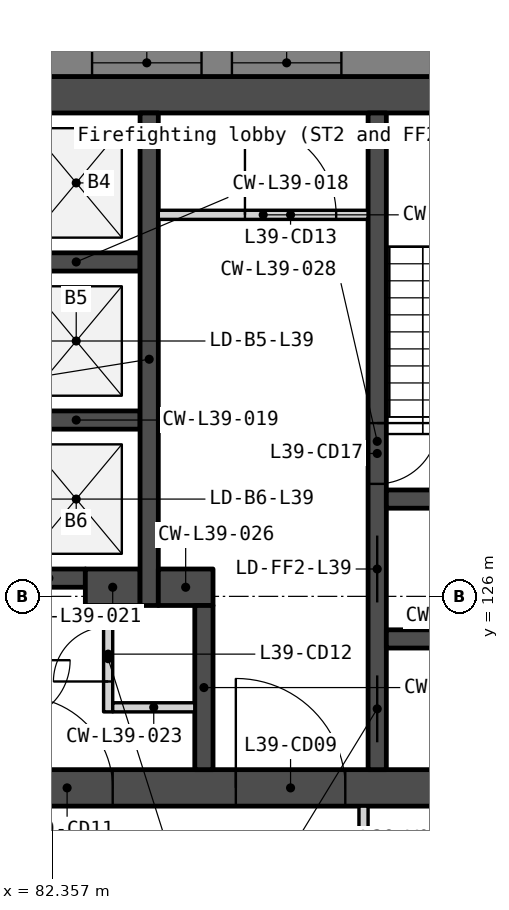
"""IFC4 building model, lengths in metres.
Left out: names, types, materials, properties, quantities, classifications, styles, units other than length and angle.
Written with IfcOpenShell. Run it as: python <this file> out.ifc"""

import sys

from ifc_helpers import new_model, si_unit, direction, frame, frame_2d, origin, place, context, subcontext, project, spatial, polyline, rectangle, outline, extrude, element, fill, save


model = new_model("IFC4")
c1 = context("Model", 3, precision=1e-05, world=origin(), true_north=direction((0.0, 1.0)))
c2 = subcontext(c1, "Body", "Model", "MODEL_VIEW")
j1 = project(units=[si_unit("LENGTHUNIT", "METRE"), si_unit("PLANEANGLEUNIT", "RADIAN")], contexts=[c1])
p1 = place(None, origin())
s1 = spatial("IfcSite", under=j1, at=p1, CompositionType="ELEMENT")
p2 = place(p1, origin())
s2 = spatial("IfcBuilding", under=s1, at=p2, CompositionType="ELEMENT")
p3 = place(p2, frame((0.0, 0.0, 155.9)))
s3 = spatial("IfcBuildingStorey", under=s2, at=p3, CompositionType="ELEMENT", Elevation=155.9)
p4 = place(p3, frame((69.0, 134.25, 0.0), z_axis=(0.0, 0.0, 1.0), x_axis=(1.0, 0.0, 0.0)))
e1 = element("IfcWall", 1, at=p4, inside=s3, PredefinedType="SOLIDWALL", context=c2, shape_type="SweptSolid", body=[
    extrude(rectangle(XDim=22.0, YDim=0.6, at=frame_2d((11.0, 0.0))), origin(), (0.0, 0.0, 1.0), 3.75),
])
p5 = place(p3, frame((69.0, 122.85, 0.0), z_axis=(0.0, 0.0, 1.0), x_axis=(1.0, 0.0, 0.0)))
e2 = element("IfcWall", 2, at=p5, inside=s3, PredefinedType="SOLIDWALL", context=c2, shape_type="SweptSolid", body=[
    extrude(rectangle(XDim=22.0, YDim=0.6, at=frame_2d((11.0, 0.0))), origin(), (0.0, 0.0, 1.0), 3.75),
])
p6 = place(p5, frame((16.375, 0.0, 0.0)))
e3 = element("IfcOpeningElement", 3, at=p6, cuts=e2, PredefinedType="OPENING", context=c2, shape_type="SweptSolid", body=[
    extrude(rectangle(XDim=1.8, YDim=2.1, at=frame_2d((0.9, 1.05))), frame((0.0, 0.31, 0.0), z_axis=(0.0, -1.0, 0.0), x_axis=(1.0, 0.0, 0.0)), (0.0, 0.0, 1.0), 0.62),
])
p7 = place(p5, frame((3.825, 0.0, 0.0)))
e4 = element("IfcOpeningElement", 4, at=p7, cuts=e2, PredefinedType="OPENING", context=c2, shape_type="SweptSolid", body=[
    extrude(rectangle(XDim=1.8, YDim=2.1, at=frame_2d((0.9, 1.05))), frame((0.0, 0.31, 0.0), z_axis=(0.0, -1.0, 0.0), x_axis=(1.0, 0.0, 0.0)), (0.0, 0.0, 1.0), 0.62),
])
p8 = place(p5, frame((12.85, 0.0, 0.0)))
e5 = element("IfcOpeningElement", 5, at=p8, cuts=e2, PredefinedType="OPENING", context=c2, shape_type="SweptSolid", body=[
    extrude(rectangle(XDim=1.5, YDim=2.1, at=frame_2d((0.75, 1.05))), frame((0.0, 0.31, 0.0), z_axis=(0.0, -1.0, 0.0), x_axis=(1.0, 0.0, 0.0)), (0.0, 0.0, 1.0), 0.62),
])
for number, where, z_axis, x_axis in (
    (6, (81.7, 131.5, 0.0), (0.0, 0.0, 1.0), (1.0, 0.0, 0.0)),
    (7, (81.7, 128.9, 0.0), (0.0, 0.0, 1.0), (1.0, 0.0, 0.0)),
):
    element("IfcWall", number, at=place(p3, frame(where, z_axis=z_axis, x_axis=x_axis)), inside=s3, PredefinedType="SOLIDWALL", context=c2, shape_type="SweptSolid", body=[
        extrude(rectangle(XDim=2.1, YDim=0.3, at=frame_2d((1.05, 0.0))), origin(), (0.0, 0.0, 1.0), 3.75),
    ])
p9 = place(p3, frame((81.7, 126.3, 0.0), z_axis=(0.0, 0.0, 1.0), x_axis=(1.0, 0.0, 0.0)))
e8 = element("IfcWall", 8, at=p9, inside=s3, PredefinedType="SOLIDWALL", context=c2, shape_type="SweptSolid", body=[
    extrude(rectangle(XDim=1.2, YDim=0.3, at=frame_2d((0.6, 0.0))), origin(), (0.0, 0.0, 1.0), 3.75),
])
p10 = place(p3, frame((82.9, 126.15, 0.0), z_axis=(0.0, 0.0, 1.0), x_axis=(1.0, 0.0, 0.0)))
e9 = element("IfcWall", 9, at=p10, inside=s3, PredefinedType="SOLIDWALL", context=c2, shape_type="SweptSolid", body=[
    extrude(rectangle(XDim=0.9, YDim=0.6, at=frame_2d((0.45, 0.0))), origin(), (0.0, 0.0, 1.0), 3.75),
])
p11 = place(p3, frame((83.275, 125.85, 0.0), z_axis=(0.0, 0.0, 1.0), x_axis=(0.0, -1.0, 0.0)))
e10 = element("IfcWall", 10, at=p11, inside=s3, PredefinedType="PARTITIONING", context=c2, shape_type="SweptSolid", body=[
    extrude(rectangle(XDim=1.75, YDim=0.15, at=frame_2d((0.875, 0.0))), origin(), (0.0, 0.0, 1.0), 3.75),
])
p12 = place(p11, frame((0.35, 0.0, 0.0)))
e11 = element("IfcOpeningElement", 11, at=p12, cuts=e10, PredefinedType="OPENING", context=c2, shape_type="SweptSolid", body=[
    extrude(rectangle(XDim=0.9, YDim=2.1, at=frame_2d((0.45, 1.05))), frame((0.0, 0.085, 0.0), z_axis=(0.0, -1.0, 0.0), x_axis=(1.0, 0.0, 0.0)), (0.0, 0.0, 1.0), 0.17),
])
p13 = place(p3, frame((83.35, 124.175, 0.0), z_axis=(0.0, 0.0, 1.0), x_axis=(1.0, 0.0, 0.0)))
e12 = element("IfcWall", 12, at=p13, inside=s3, PredefinedType="PARTITIONING", context=c2, shape_type="SweptSolid", body=[
    extrude(rectangle(XDim=1.35, YDim=0.15, at=frame_2d((0.675, 0.0))), origin(), (0.0, 0.0, 1.0), 3.75),
])
p14 = place(p3, frame((83.95, 133.95, 0.0), z_axis=(0.0, 0.0, 1.0), x_axis=(0.0, -1.0, 0.0)))
e13 = element("IfcWall", 13, at=p14, inside=s3, PredefinedType="SOLIDWALL", context=c2, shape_type="SweptSolid", body=[
    extrude(rectangle(XDim=8.1, YDim=0.3, at=frame_2d((4.05, 0.0))), origin(), (0.0, 0.0, 1.0), 3.75),
])
p15 = place(p3, frame((84.1, 132.275, 0.0), z_axis=(0.0, 0.0, 1.0), x_axis=(1.0, 0.0, 0.0)))
e14 = element("IfcWall", 14, at=p15, inside=s3, PredefinedType="PARTITIONING", context=c2, shape_type="SweptSolid", body=[
    extrude(rectangle(XDim=3.45, YDim=0.15, at=frame_2d((1.725, 0.0))), origin(), (0.0, 0.0, 1.0), 3.75),
])
p16 = place(p15, frame((1.425, 0.0, 0.0)))
e15 = element("IfcOpeningElement", 15, at=p16, cuts=e14, PredefinedType="OPENING", context=c2, shape_type="SweptSolid", body=[
    extrude(rectangle(XDim=1.5, YDim=2.1, at=frame_2d((0.75, 1.05))), frame((0.0, 0.085, 0.0), z_axis=(0.0, -1.0, 0.0), x_axis=(1.0, 0.0, 0.0)), (0.0, 0.0, 1.0), 0.17),
])
p17 = place(p3, frame((84.1, 126.15, 0.0), z_axis=(0.0, 0.0, 1.0), x_axis=(1.0, 0.0, 0.0)))
e16 = element("IfcWall", 16, at=p17, inside=s3, PredefinedType="SOLIDWALL", context=c2, shape_type="SweptSolid", body=[
    extrude(rectangle(XDim=0.9, YDim=0.6, at=frame_2d((0.45, 0.0))), origin(), (0.0, 0.0, 1.0), 3.75),
])
p18 = place(p3, frame((84.85, 125.85, 0.0), z_axis=(0.0, 0.0, 1.0), x_axis=(0.0, -1.0, 0.0)))
e17 = element("IfcWall", 17, at=p18, inside=s3, PredefinedType="SOLIDWALL", context=c2, shape_type="SweptSolid", body=[
    extrude(rectangle(XDim=2.7, YDim=0.3, at=frame_2d((1.35, 0.0))), origin(), (0.0, 0.0, 1.0), 3.75),
])
p19 = place(p3, frame((87.7, 133.95, 0.0), z_axis=(0.0, 0.0, 1.0), x_axis=(0.0, -1.0, 0.0)))
e18 = element("IfcWall", 18, at=p19, inside=s3, PredefinedType="SOLIDWALL", context=c2, shape_type="SweptSolid", body=[
    extrude(rectangle(XDim=10.8, YDim=0.3, at=frame_2d((5.4, 0.0))), origin(), (0.0, 0.0, 1.0), 3.75),
])
p20 = place(p19, frame((6.95, 0.0, 0.0)))
e19 = element("IfcOpeningElement", 19, at=p20, cuts=e18, PredefinedType="OPENING", context=c2, shape_type="SweptSolid", body=[
    extrude(rectangle(XDim=1.1, YDim=2.1, at=frame_2d((0.55, 1.05))), frame((0.0, 0.16, 0.0), z_axis=(0.0, -1.0, 0.0), x_axis=(1.0, 0.0, 0.0)), (0.0, 0.0, 1.0), 0.32),
])
p21 = place(p19, frame((5.1, 0.0, 0.0)))
e20 = element("IfcOpeningElement", 20, at=p21, cuts=e18, PredefinedType="OPENING", context=c2, shape_type="SweptSolid", body=[
    extrude(rectangle(XDim=1.0, YDim=2.1, at=frame_2d((0.5, 1.05))), frame((0.0, 0.16, 0.0), z_axis=(0.0, -1.0, 0.0), x_axis=(1.0, 0.0, 0.0)), (0.0, 0.0, 1.0), 0.32),
])
p22 = place(p19, frame((9.25, 0.0, 0.0)))
e21 = element("IfcOpeningElement", 21, at=p22, cuts=e18, PredefinedType="OPENING", context=c2, shape_type="SweptSolid", body=[
    extrude(rectangle(XDim=1.1, YDim=2.1, at=frame_2d((0.55, 1.05))), frame((0.0, 0.16, 0.0), z_axis=(0.0, -1.0, 0.0), x_axis=(1.0, 0.0, 0.0)), (0.0, 0.0, 1.0), 0.32),
])
for number, where, z_axis, x_axis in (
    (22, (87.85, 127.6, 0.0), (0.0, 0.0, 1.0), (1.0, 0.0, 0.0)),
    (23, (87.85, 125.3, 0.0), (0.0, 0.0, 1.0), (1.0, 0.0, 0.0)),
):
    element("IfcWall", number, at=place(p3, frame(where, z_axis=z_axis, x_axis=x_axis)), inside=s3, PredefinedType="SOLIDWALL", context=c2, shape_type="SweptSolid", body=[
        extrude(rectangle(XDim=2.55, YDim=0.3, at=frame_2d((1.275, 0.0))), origin(), (0.0, 0.0, 1.0), 3.75),
    ])
p23 = place(p3, frame((100.243, 134.775, -0.15), z_axis=(0.0, 0.0, 1.0), x_axis=(-1.0, 0.0, 0.0)))
e24 = element("IfcWall", 24, at=p23, inside=s3, PredefinedType="SOLIDWALL", context=c2, shape_type="SweptSolid", body=[
    extrude(outline(polyline([(40.486, 0.0), (40.486, 3.9), (0.0, 3.9), (0.0, 0.0), (40.486, 0.0)])), frame((0.0, 0.225, 0.0), z_axis=(0.0, -1.0, 0.0), x_axis=(1.0, 0.0, 0.0)), (0.0, 0.0, 1.0), 0.45),
])
p24 = place(p23, frame((3.011, 0.0, 0.95)))
e25 = element("IfcOpeningElement", 25, at=p24, cuts=e24, PredefinedType="OPENING", context=c2, shape_type="SweptSolid", body=[
    extrude(rectangle(XDim=1.8, YDim=2.2, at=frame_2d((0.9, 1.1))), frame((0.0, 0.235, 0.0), z_axis=(0.0, -1.0, 0.0), x_axis=(1.0, 0.0, 0.0)), (0.0, 0.0, 1.0), 0.47),
])
p25 = place(p23, frame((5.311, 0.0, 0.95)))
e26 = element("IfcOpeningElement", 26, at=p25, cuts=e24, PredefinedType="OPENING", context=c2, shape_type="SweptSolid", body=[
    extrude(rectangle(XDim=1.8, YDim=2.2, at=frame_2d((0.9, 1.1))), frame((0.0, 0.235, 0.0), z_axis=(0.0, -1.0, 0.0), x_axis=(1.0, 0.0, 0.0)), (0.0, 0.0, 1.0), 0.47),
])
p26 = place(p23, frame((13.132, 0.0, 0.95)))
e27 = element("IfcOpeningElement", 27, at=p26, cuts=e24, PredefinedType="OPENING", context=c2, shape_type="SweptSolid", body=[
    extrude(rectangle(XDim=1.8, YDim=2.2, at=frame_2d((0.9, 1.1))), frame((0.0, 0.235, 0.0), z_axis=(0.0, -1.0, 0.0), x_axis=(1.0, 0.0, 0.0)), (0.0, 0.0, 1.0), 0.47),
])
p27 = place(p23, frame((15.432, 0.0, 0.95)))
e28 = element("IfcOpeningElement", 28, at=p27, cuts=e24, PredefinedType="OPENING", context=c2, shape_type="SweptSolid", body=[
    extrude(rectangle(XDim=1.8, YDim=2.2, at=frame_2d((0.9, 1.1))), frame((0.0, 0.235, 0.0), z_axis=(0.0, -1.0, 0.0), x_axis=(1.0, 0.0, 0.0)), (0.0, 0.0, 1.0), 0.47),
])
p28 = place(p23, frame((23.254, 0.0, 0.95)))
e29 = element("IfcOpeningElement", 29, at=p28, cuts=e24, PredefinedType="OPENING", context=c2, shape_type="SweptSolid", body=[
    extrude(rectangle(XDim=1.8, YDim=2.2, at=frame_2d((0.9, 1.1))), frame((0.0, 0.235, 0.0), z_axis=(0.0, -1.0, 0.0), x_axis=(1.0, 0.0, 0.0)), (0.0, 0.0, 1.0), 0.47),
])
p29 = place(p23, frame((25.554, 0.0, 0.95)))
e30 = element("IfcOpeningElement", 30, at=p29, cuts=e24, PredefinedType="OPENING", context=c2, shape_type="SweptSolid", body=[
    extrude(rectangle(XDim=1.8, YDim=2.2, at=frame_2d((0.9, 1.1))), frame((0.0, 0.235, 0.0), z_axis=(0.0, -1.0, 0.0), x_axis=(1.0, 0.0, 0.0)), (0.0, 0.0, 1.0), 0.47),
])
p30 = place(p23, frame((33.375, 0.0, 0.95)))
e31 = element("IfcOpeningElement", 31, at=p30, cuts=e24, PredefinedType="OPENING", context=c2, shape_type="SweptSolid", body=[
    extrude(rectangle(XDim=1.8, YDim=2.2, at=frame_2d((0.9, 1.1))), frame((0.0, 0.235, 0.0), z_axis=(0.0, -1.0, 0.0), x_axis=(1.0, 0.0, 0.0)), (0.0, 0.0, 1.0), 0.47),
])
p31 = place(p23, frame((35.675, 0.0, 0.95)))
e32 = element("IfcOpeningElement", 32, at=p31, cuts=e24, PredefinedType="OPENING", context=c2, shape_type="SweptSolid", body=[
    extrude(rectangle(XDim=1.8, YDim=2.2, at=frame_2d((0.9, 1.1))), frame((0.0, 0.235, 0.0), z_axis=(0.0, -1.0, 0.0), x_axis=(1.0, 0.0, 0.0)), (0.0, 0.0, 1.0), 0.47),
])
p32 = place(p3, frame((82.105, 96.067, -0.15), z_axis=(0.0, 0.0, 1.0), x_axis=(0.499997369791, 0.866026922331, 0.0)))
e33 = element("IfcWall", 33, at=p32, inside=s3, PredefinedType="SOLIDWALL", context=c2, shape_type="SweptSolid", body=[
    extrude(outline(polyline([(40.486, 0.0), (40.486, 3.9), (0.0, 3.9), (0.0, 0.0), (40.486, 0.0)])), frame((0.0, 0.225, 0.0), z_axis=(0.0, -1.0, 0.0), x_axis=(1.0, 0.0, 0.0)), (0.0, 0.0, 1.0), 0.45),
])
p33 = place(p32, frame((3.011, 0.0, 0.95)))
e34 = element("IfcOpeningElement", 34, at=p33, cuts=e33, PredefinedType="OPENING", context=c2, shape_type="SweptSolid", body=[
    extrude(rectangle(XDim=1.8, YDim=2.2, at=frame_2d((0.9, 1.1))), frame((0.0, 0.235, 0.0), z_axis=(0.0, -1.0, 0.0), x_axis=(1.0, 0.0, 0.0)), (0.0, 0.0, 1.0), 0.47),
])
p34 = place(p32, frame((5.311, 0.0, 0.95)))
e35 = element("IfcOpeningElement", 35, at=p34, cuts=e33, PredefinedType="OPENING", context=c2, shape_type="SweptSolid", body=[
    extrude(rectangle(XDim=1.8, YDim=2.2, at=frame_2d((0.9, 1.1))), frame((0.0, 0.235, 0.0), z_axis=(0.0, -1.0, 0.0), x_axis=(1.0, 0.0, 0.0)), (0.0, 0.0, 1.0), 0.47),
])
p35 = place(p32, frame((13.132, 0.0, 0.95)))
e36 = element("IfcOpeningElement", 36, at=p35, cuts=e33, PredefinedType="OPENING", context=c2, shape_type="SweptSolid", body=[
    extrude(rectangle(XDim=1.8, YDim=2.2, at=frame_2d((0.9, 1.1))), frame((0.0, 0.235, 0.0), z_axis=(0.0, -1.0, 0.0), x_axis=(1.0, 0.0, 0.0)), (0.0, 0.0, 1.0), 0.47),
])
p36 = place(p32, frame((15.432, 0.0, 0.95)))
e37 = element("IfcOpeningElement", 37, at=p36, cuts=e33, PredefinedType="OPENING", context=c2, shape_type="SweptSolid", body=[
    extrude(rectangle(XDim=1.8, YDim=2.2, at=frame_2d((0.9, 1.1))), frame((0.0, 0.235, 0.0), z_axis=(0.0, -1.0, 0.0), x_axis=(1.0, 0.0, 0.0)), (0.0, 0.0, 1.0), 0.47),
])
p37 = place(p32, frame((23.254, 0.0, 0.95)))
e38 = element("IfcOpeningElement", 38, at=p37, cuts=e33, PredefinedType="OPENING", context=c2, shape_type="SweptSolid", body=[
    extrude(rectangle(XDim=1.8, YDim=2.2, at=frame_2d((0.9, 1.1))), frame((0.0, 0.235, 0.0), z_axis=(0.0, -1.0, 0.0), x_axis=(1.0, 0.0, 0.0)), (0.0, 0.0, 1.0), 0.47),
])
p38 = place(p32, frame((25.554, 0.0, 0.95)))
e39 = element("IfcOpeningElement", 39, at=p38, cuts=e33, PredefinedType="OPENING", context=c2, shape_type="SweptSolid", body=[
    extrude(rectangle(XDim=1.8, YDim=2.2, at=frame_2d((0.9, 1.1))), frame((0.0, 0.235, 0.0), z_axis=(0.0, -1.0, 0.0), x_axis=(1.0, 0.0, 0.0)), (0.0, 0.0, 1.0), 0.47),
])
p39 = place(p32, frame((33.375, 0.0, 0.95)))
e40 = element("IfcOpeningElement", 40, at=p39, cuts=e33, PredefinedType="OPENING", context=c2, shape_type="SweptSolid", body=[
    extrude(rectangle(XDim=1.8, YDim=2.2, at=frame_2d((0.9, 1.1))), frame((0.0, 0.235, 0.0), z_axis=(0.0, -1.0, 0.0), x_axis=(1.0, 0.0, 0.0)), (0.0, 0.0, 1.0), 0.47),
])
p40 = place(p32, frame((35.675, 0.0, 0.95)))
e41 = element("IfcOpeningElement", 41, at=p40, cuts=e33, PredefinedType="OPENING", context=c2, shape_type="SweptSolid", body=[
    extrude(rectangle(XDim=1.8, YDim=2.2, at=frame_2d((0.9, 1.1))), frame((0.0, 0.235, 0.0), z_axis=(0.0, -1.0, 0.0), x_axis=(1.0, 0.0, 0.0)), (0.0, 0.0, 1.0), 0.47),
])
p41 = place(p3, frame((87.475, 120.05, 0.0), z_axis=(0.0, 0.0, 1.0), x_axis=(0.0, 1.0, 0.0)))
e42 = element("IfcWall", 42, at=p41, inside=s3, PredefinedType="PARTITIONING", context=c2, shape_type="SweptSolid", body=[
    extrude(rectangle(XDim=2.5, YDim=0.15, at=frame_2d((1.25, 0.0))), origin(), (0.0, 0.0, 1.0), 3.75),
])
p42 = place(p41, frame((0.75, 0.0, 0.0)))
e43 = element("IfcOpeningElement", 43, at=p42, cuts=e42, PredefinedType="OPENING", context=c2, shape_type="SweptSolid", body=[
    extrude(rectangle(XDim=1.0, YDim=2.1, at=frame_2d((0.5, 1.05))), frame((0.0, 0.085, 0.0), z_axis=(0.0, -1.0, 0.0), x_axis=(1.0, 0.0, 0.0)), (0.0, 0.0, 1.0), 0.17),
])
p43 = place(p20, origin())
e44 = element("IfcDoor", 44, at=p43, inside=s3, OperationType="SLIDING_TO_LEFT", PredefinedType="DOOR", context=c2, shape_type="SweptSolid", body=[
    extrude(rectangle(XDim=1.1, YDim=2.1, at=frame_2d((0.55, 1.05))), frame((0.0, 0.025, 0.0), z_axis=(0.0, -1.0, 0.0), x_axis=(1.0, 0.0, 0.0)), (0.0, 0.0, 1.0), 0.05),
])
fill(e19, e44)
p44 = place(p6, origin())
e45 = element("IfcDoor", 45, at=p44, inside=s3, OperationType="DOUBLE_DOOR_DOUBLE_SWING", PredefinedType="DOOR", context=c2, shape_type="SweptSolid", body=[
    extrude(rectangle(XDim=1.8, YDim=2.1, at=frame_2d((0.9, 1.05))), frame((0.0, 0.025, 0.0), z_axis=(0.0, -1.0, 0.0), x_axis=(1.0, 0.0, 0.0)), (0.0, 0.0, 1.0), 0.05),
])
fill(e3, e45)
p45 = place(p8, origin())
e46 = element("IfcDoor", 46, at=p45, inside=s3, OperationType="DOUBLE_DOOR_DOUBLE_SWING", PredefinedType="DOOR", context=c2, shape_type="SweptSolid", body=[
    extrude(rectangle(XDim=1.5, YDim=2.1, at=frame_2d((0.75, 1.05))), frame((0.0, 0.025, 0.0), z_axis=(0.0, -1.0, 0.0), x_axis=(1.0, 0.0, 0.0)), (0.0, 0.0, 1.0), 0.05),
])
fill(e5, e46)
p46 = place(p12, origin())
e47 = element("IfcDoor", 47, at=p46, inside=s3, OperationType="SINGLE_SWING_RIGHT", PredefinedType="DOOR", context=c2, shape_type="SweptSolid", body=[
    extrude(rectangle(XDim=0.9, YDim=2.1, at=frame_2d((0.45, 1.05))), frame((0.0, 0.025, 0.0), z_axis=(0.0, -1.0, 0.0), x_axis=(1.0, 0.0, 0.0)), (0.0, 0.0, 1.0), 0.05),
])
fill(e11, e47)
p47 = place(p16, origin())
e48 = element("IfcDoor", 48, at=p47, inside=s3, OperationType="DOUBLE_DOOR_DOUBLE_SWING", PredefinedType="DOOR", context=c2, shape_type="SweptSolid", body=[
    extrude(rectangle(XDim=1.5, YDim=2.1, at=frame_2d((0.75, 1.05))), frame((0.0, 0.025, 0.0), z_axis=(0.0, -1.0, 0.0), x_axis=(1.0, 0.0, 0.0)), (0.0, 0.0, 1.0), 0.05),
])
fill(e15, e48)
p48 = place(p21, origin())
e49 = element("IfcDoor", 49, at=p48, inside=s3, OperationType="SINGLE_SWING_LEFT", PredefinedType="DOOR", context=c2, shape_type="SweptSolid", body=[
    extrude(rectangle(XDim=1.0, YDim=2.1, at=frame_2d((0.5, 1.05))), frame((0.0, 0.025, 0.0), z_axis=(0.0, -1.0, 0.0), x_axis=(1.0, 0.0, 0.0)), (0.0, 0.0, 1.0), 0.05),
])
fill(e20, e49)
p49 = place(p22, origin())
e50 = element("IfcDoor", 50, at=p49, inside=s3, OperationType="SLIDING_TO_LEFT", PredefinedType="DOOR", context=c2, shape_type="SweptSolid", body=[
    extrude(rectangle(XDim=1.1, YDim=2.1, at=frame_2d((0.55, 1.05))), frame((0.0, 0.025, 0.0), z_axis=(0.0, -1.0, 0.0), x_axis=(1.0, 0.0, 0.0)), (0.0, 0.0, 1.0), 0.05),
])
fill(e21, e50)
p50 = place(p26, origin())
e51 = element("IfcWindow", 51, at=p50, inside=s3, PartitioningType="SINGLE_PANEL", PredefinedType="WINDOW", context=c2, shape_type="SweptSolid", body=[
    extrude(rectangle(XDim=1.8, YDim=2.2, at=frame_2d((0.9, 1.1))), frame((0.0, 0.03, 0.0), z_axis=(0.0, -1.0, 0.0), x_axis=(1.0, 0.0, 0.0)), (0.0, 0.0, 1.0), 0.06),
])
fill(e27, e51)
p51 = place(p27, origin())
e52 = element("IfcWindow", 52, at=p51, inside=s3, PartitioningType="SINGLE_PANEL", PredefinedType="WINDOW", context=c2, shape_type="SweptSolid", body=[
    extrude(rectangle(XDim=1.8, YDim=2.2, at=frame_2d((0.9, 1.1))), frame((0.0, 0.03, 0.0), z_axis=(0.0, -1.0, 0.0), x_axis=(1.0, 0.0, 0.0)), (0.0, 0.0, 1.0), 0.06),
])
fill(e28, e52)
save(model, sys.argv[1])
